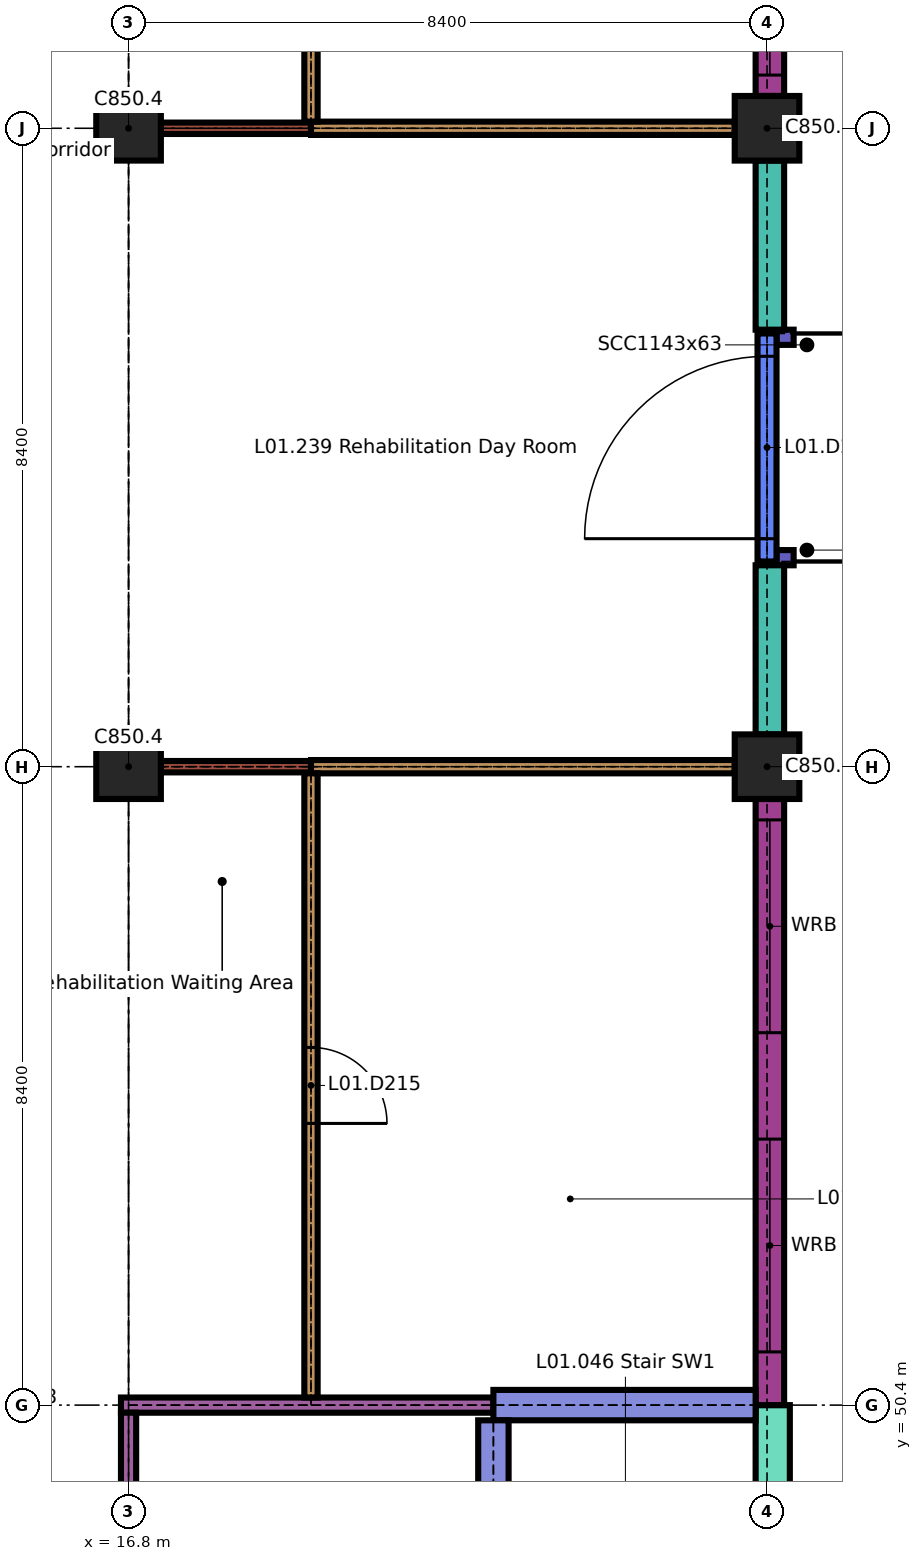
"""IFC4 building model, lengths in metres.
Left out: names, types, materials, properties, quantities, classifications, styles, units other than length and angle.
Written with IfcOpenShell. Run it as: python <this file> out.ifc"""

import sys

from ifc_helpers import new_model, si_unit, direction, frame, frame_2d, origin, origin_2d, place, context, subcontext, project, spatial, rectangle, hollow_circle, extrude, element, fill, save


model = new_model("IFC4")
c1 = context("Model", 3, precision=1e-05, world=origin(), true_north=direction((0.0, 1.0)))
c2 = subcontext(c1, "Body", "Model", "MODEL_VIEW")
j1 = project(units=[si_unit("LENGTHUNIT", "METRE"), si_unit("PLANEANGLEUNIT", "RADIAN")], contexts=[c1])
p1 = place(None, origin())
s1 = spatial("IfcSite", under=j1, at=p1, CompositionType="ELEMENT")
p2 = place(p1, origin())
s2 = spatial("IfcBuilding", under=s1, at=p2, CompositionType="ELEMENT")
p3 = place(p2, frame((0.0, 0.0, 4.5)))
s3 = spatial("IfcBuildingStorey", under=s2, at=p3, CompositionType="ELEMENT", Elevation=4.5)
for number, where, z_axis, x_axis in (
    (1, (16.8, 58.8, 0.0), (0.0, 0.0, 1.0), (1.0, 0.0, 0.0)),
    (2, (25.2, 58.8, 0.0), (0.0, 0.0, 1.0), (1.0, 0.0, 0.0)),
    (3, (16.8, 67.2, 0.0), (0.0, 0.0, 1.0), (1.0, 0.0, 0.0)),
    (4, (25.2, 67.2, 0.0), (0.0, 0.0, 1.0), (1.0, 0.0, 0.0)),
):
    element("IfcColumn", number, at=place(p3, frame(where, z_axis=z_axis, x_axis=x_axis)), inside=s3, PredefinedType="COLUMN", context=c2, shape_type="SweptSolid", body=[
        extrude(rectangle(XDim=0.85, YDim=0.85, at=origin_2d()), origin(), (0.0, 0.0, 1.0), 3.45),
    ])
for number, where, z_axis, x_axis in (
    (5, (25.725, 61.65, 0.0), (0.0, 0.0, 1.0), (1.0, 0.0, 0.0)),
    (6, (25.725, 64.35, 0.0), (0.0, 0.0, 1.0), (1.0, 0.0, 0.0)),
):
    element("IfcColumn", number, at=place(p3, frame(where, z_axis=z_axis, x_axis=x_axis)), inside=s3, PredefinedType="COLUMN", context=c2, shape_type="SweptSolid", body=[
        extrude(hollow_circle(Radius=0.057, WallThickness=0.006, at=origin_2d()), origin(), (0.0, 0.0, 1.0), 3.117),
    ])
for number, where, z_axis, x_axis in (
    (7, (25.325, 61.55, 0.0), (0.0, 0.0, 1.0), (1.0, 0.0, 0.0)),
    (8, (25.325, 64.45, 0.0), (0.0, 0.0, 1.0), (1.0, 0.0, 0.0)),
):
    element("IfcWall", number, at=place(p3, frame(where, z_axis=z_axis, x_axis=x_axis)), inside=s3, PredefinedType="SOLIDWALL", context=c2, shape_type="SweptSolid", body=[
        extrude(rectangle(XDim=0.225, YDim=0.2, at=frame_2d((0.113, 0.0))), origin(), (0.0, 0.0, 1.0), 3.25),
    ])
p4 = place(p3, frame((25.275, 46.55, 0.0), z_axis=(0.0, 0.0, 1.0), x_axis=(0.0, 1.0, 0.0)))
e9 = element("IfcWall", 9, at=p4, inside=s3, PredefinedType="SOLIDWALL", context=c2, shape_type="SweptSolid", body=[
    extrude(rectangle(XDim=3.85, YDim=0.45, at=frame_2d((1.925, 0.0))), origin(), (0.0, 0.0, 1.0), 3.45),
])
p5 = place(p3, frame((25.238, 50.4, 0.0), z_axis=(0.0, 0.0, 1.0), x_axis=(0.0, 1.0, 0.0)))
e10 = element("IfcWall", 10, at=p5, inside=s3, PredefinedType="SOLIDWALL", context=c2, shape_type="SweptSolid", body=[
    extrude(rectangle(XDim=7.975, YDim=0.375, at=frame_2d((3.988, 0.0))), origin(), (0.0, 0.0, 1.0), 3.15),
])
p6 = place(p5, frame((0.7, 0.0, 1.0)))
e11 = element("IfcOpeningElement", 11, at=p6, cuts=e10, PredefinedType="OPENING", context=c2, shape_type="SweptSolid", body=[
    extrude(rectangle(XDim=2.8, YDim=1.2, at=frame_2d((1.4, 0.6))), frame((0.0, 0.198, 0.0), z_axis=(0.0, -1.0, 0.0), x_axis=(1.0, 0.0, 0.0)), (0.0, 0.0, 1.0), 0.395),
])
p7 = place(p5, frame((4.9, 0.0, 1.0)))
e12 = element("IfcOpeningElement", 12, at=p7, cuts=e10, PredefinedType="OPENING", context=c2, shape_type="SweptSolid", body=[
    extrude(rectangle(XDim=2.8, YDim=1.2, at=frame_2d((1.4, 0.6))), frame((0.0, 0.198, 0.0), z_axis=(0.0, -1.0, 0.0), x_axis=(1.0, 0.0, 0.0)), (0.0, 0.0, 1.0), 0.395),
])
for number, where, z_axis, x_axis in (
    (13, (25.238, 59.225, 0.0), (0.0, 0.0, 1.0), (0.0, 1.0, 0.0)),
    (14, (25.238, 64.55, 0.0), (0.0, 0.0, 1.0), (0.0, 1.0, 0.0)),
):
    element("IfcWall", number, at=place(p3, frame(where, z_axis=z_axis, x_axis=x_axis)), inside=s3, PredefinedType="SOLIDWALL", context=c2, shape_type="SweptSolid", body=[
        extrude(rectangle(XDim=2.225, YDim=0.375, at=frame_2d((1.112, 0.0))), origin(), (0.0, 0.0, 1.0), 3.45),
    ])
p8 = place(p3, frame((25.238, 67.625, 0.0), z_axis=(0.0, 0.0, 1.0), x_axis=(0.0, 1.0, 0.0)))
e15 = element("IfcWall", 15, at=p8, inside=s3, PredefinedType="SOLIDWALL", context=c2, shape_type="SweptSolid", body=[
    extrude(rectangle(XDim=7.975, YDim=0.375, at=frame_2d((3.988, 0.0))), origin(), (0.0, 0.0, 1.0), 3.15),
])
p9 = place(p8, frame((0.275, 0.0, 1.0)))
e16 = element("IfcOpeningElement", 16, at=p9, cuts=e15, PredefinedType="OPENING", context=c2, shape_type="SweptSolid", body=[
    extrude(rectangle(XDim=2.8, YDim=1.2, at=frame_2d((1.4, 0.6))), frame((0.0, 0.198, 0.0), z_axis=(0.0, -1.0, 0.0), x_axis=(1.0, 0.0, 0.0)), (0.0, 0.0, 1.0), 0.395),
])
p10 = place(p8, frame((4.475, 0.0, 1.0)))
e17 = element("IfcOpeningElement", 17, at=p10, cuts=e15, PredefinedType="OPENING", context=c2, shape_type="SweptSolid", body=[
    extrude(rectangle(XDim=2.8, YDim=1.2, at=frame_2d((1.4, 0.6))), frame((0.0, 0.198, 0.0), z_axis=(0.0, -1.0, 0.0), x_axis=(1.0, 0.0, 0.0)), (0.0, 0.0, 1.0), 0.395),
])
p11 = place(p3, frame((16.7, 50.4, 0.0), z_axis=(0.0, 0.0, 1.0), x_axis=(1.0, 0.0, 0.0)))
e18 = element("IfcWall", 18, at=p11, inside=s3, PredefinedType="PARTITIONING", context=c2, shape_type="SweptSolid", body=[
    extrude(rectangle(XDim=4.9, YDim=0.2, at=frame_2d((2.45, 0.0))), origin(), (0.0, 0.0, 1.0), 3.45),
])
p12 = place(p3, frame((21.6, 50.4, 0.0), z_axis=(0.0, 0.0, 1.0), x_axis=(1.0, 0.0, 0.0)))
e19 = element("IfcWall", 19, at=p12, inside=s3, PredefinedType="SHEAR", context=c2, shape_type="SweptSolid", body=[
    extrude(rectangle(XDim=3.45, YDim=0.4, at=frame_2d((1.725, 0.0))), origin(), (0.0, 0.0, 1.0), 3.45),
])
p13 = place(p3, frame((17.225, 58.8, 0.0), z_axis=(0.0, 0.0, 1.0), x_axis=(1.0, 0.0, 0.0)))
e20 = element("IfcWall", 20, at=p13, inside=s3, PredefinedType="PARTITIONING", context=c2, shape_type="SweptSolid", body=[
    extrude(rectangle(XDim=1.975, YDim=0.15, at=frame_2d((0.987, 0.0))), origin(), (0.0, 0.0, 1.0), 3.45),
])
p14 = place(p3, frame((19.2, 58.8, 0.0), z_axis=(0.0, 0.0, 1.0), x_axis=(1.0, 0.0, 0.0)))
e21 = element("IfcWall", 21, at=p14, inside=s3, PredefinedType="PARTITIONING", context=c2, shape_type="SweptSolid", body=[
    extrude(rectangle(XDim=5.575, YDim=0.175, at=frame_2d((2.788, 0.0))), origin(), (0.0, 0.0, 1.0), 3.45),
])
p15 = place(p3, frame((17.225, 67.2, 0.0), z_axis=(0.0, 0.0, 1.0), x_axis=(1.0, 0.0, 0.0)))
e22 = element("IfcWall", 22, at=p15, inside=s3, PredefinedType="PARTITIONING", context=c2, shape_type="SweptSolid", body=[
    extrude(rectangle(XDim=1.975, YDim=0.15, at=frame_2d((0.987, 0.0))), origin(), (0.0, 0.0, 1.0), 3.45),
])
p16 = place(p3, frame((19.2, 67.2, 0.0), z_axis=(0.0, 0.0, 1.0), x_axis=(1.0, 0.0, 0.0)))
e23 = element("IfcWall", 23, at=p16, inside=s3, PredefinedType="PARTITIONING", context=c2, shape_type="SweptSolid", body=[
    extrude(rectangle(XDim=5.575, YDim=0.175, at=frame_2d((2.788, 0.0))), origin(), (0.0, 0.0, 1.0), 3.45),
])
p17 = place(p3, frame((16.8, 42.1, 0.0), z_axis=(0.0, 0.0, 1.0), x_axis=(0.0, 1.0, 0.0)))
e24 = element("IfcWall", 24, at=p17, inside=s3, PredefinedType="PARTITIONING", context=c2, shape_type="SweptSolid", body=[
    extrude(rectangle(XDim=8.2, YDim=0.2, at=frame_2d((4.1, 0.0))), origin(), (0.0, 0.0, 1.0), 3.45),
])
p18 = place(p17, frame((3.4, 0.0, 0.0)))
e25 = element("IfcOpeningElement", 25, at=p18, cuts=e24, PredefinedType="OPENING", context=c2, shape_type="SweptSolid", body=[
    extrude(rectangle(XDim=1.4, YDim=2.1, at=frame_2d((0.7, 1.05))), frame((0.0, 0.11, 0.0), z_axis=(0.0, -1.0, 0.0), x_axis=(1.0, 0.0, 0.0)), (0.0, 0.0, 1.0), 0.22),
])
p19 = place(p3, frame((19.2, 50.5, 0.0), z_axis=(0.0, 0.0, 1.0), x_axis=(0.0, 1.0, 0.0)))
e26 = element("IfcWall", 26, at=p19, inside=s3, PredefinedType="PARTITIONING", context=c2, shape_type="SweptSolid", body=[
    extrude(rectangle(XDim=8.212, YDim=0.175, at=frame_2d((4.106, 0.0))), origin(), (0.0, 0.0, 1.0), 3.45),
])
p20 = place(p19, frame((3.606, 0.0, 0.0)))
e27 = element("IfcOpeningElement", 27, at=p20, cuts=e26, PredefinedType="OPENING", context=c2, shape_type="SweptSolid", body=[
    extrude(rectangle(XDim=1.0, YDim=2.1, at=frame_2d((0.5, 1.05))), frame((0.0, 0.097, 0.0), z_axis=(0.0, -1.0, 0.0), x_axis=(1.0, 0.0, 0.0)), (0.0, 0.0, 1.0), 0.195),
])
p21 = place(p3, frame((19.2, 67.288, 0.0), z_axis=(0.0, 0.0, 1.0), x_axis=(0.0, 1.0, 0.0)))
e28 = element("IfcWall", 28, at=p21, inside=s3, PredefinedType="PARTITIONING", context=c2, shape_type="SweptSolid", body=[
    extrude(rectangle(XDim=8.212, YDim=0.175, at=frame_2d((4.106, 0.0))), origin(), (0.0, 0.0, 1.0), 3.45),
])
p22 = place(p21, frame((3.606, 0.0, 0.0)))
e29 = element("IfcOpeningElement", 29, at=p22, cuts=e28, PredefinedType="OPENING", context=c2, shape_type="SweptSolid", body=[
    extrude(rectangle(XDim=1.0, YDim=2.1, at=frame_2d((0.5, 1.05))), frame((0.0, 0.097, 0.0), z_axis=(0.0, -1.0, 0.0), x_axis=(1.0, 0.0, 0.0)), (0.0, 0.0, 1.0), 0.195),
])
p23 = place(p3, frame((21.6, 42.2, 0.0), z_axis=(0.0, 0.0, 1.0), x_axis=(0.0, 1.0, 0.0)))
e30 = element("IfcWall", 30, at=p23, inside=s3, PredefinedType="SHEAR", context=c2, shape_type="SweptSolid", body=[
    extrude(rectangle(XDim=8.0, YDim=0.4, at=frame_2d((4.0, 0.0))), origin(), (0.0, 0.0, 1.0), 3.45),
])
p24 = place(p23, frame((0.4, 0.0, 0.0)))
e31 = element("IfcOpeningElement", 31, at=p24, cuts=e30, PredefinedType="OPENING", context=c2, shape_type="SweptSolid", body=[
    extrude(rectangle(XDim=1.2, YDim=2.1, at=frame_2d((0.6, 1.05))), frame((0.0, 0.21, 0.0), z_axis=(0.0, -1.0, 0.0), x_axis=(1.0, 0.0, 0.0)), (0.0, 0.0, 1.0), 0.42),
])
p25 = place(p3, frame((25.2, 61.5, 0.0), z_axis=(0.0, 0.0, 1.0), x_axis=(0.0, 1.0, 0.0)))
e32 = element("IfcWall", 32, at=p25, inside=s3, PredefinedType="SOLIDWALL", context=c2, shape_type="SweptSolid", body=[
    extrude(rectangle(XDim=3.0, YDim=0.25, at=frame_2d((1.5, 0.0))), origin(), (0.0, 0.0, 1.0), 3.45),
])
p26 = place(p25, frame((0.3, 0.0, 0.0)))
e33 = element("IfcOpeningElement", 33, at=p26, cuts=e32, PredefinedType="OPENING", context=c2, shape_type="SweptSolid", body=[
    extrude(rectangle(XDim=2.4, YDim=2.4, at=frame_2d((1.2, 1.2))), frame((0.0, 0.135, 0.0), z_axis=(0.0, -1.0, 0.0), x_axis=(1.0, 0.0, 0.0)), (0.0, 0.0, 1.0), 0.27),
])
p27 = place(p6, origin())
e34 = element("IfcWindow", 34, at=p27, inside=s3, PartitioningType="DOUBLE_PANEL_VERTICAL", PredefinedType="WINDOW", context=c2, shape_type="SweptSolid", body=[
    extrude(rectangle(XDim=2.8, YDim=1.2, at=frame_2d((1.4, 0.6))), frame((0.0, 0.03, 0.0), z_axis=(0.0, -1.0, 0.0), x_axis=(1.0, 0.0, 0.0)), (0.0, 0.0, 1.0), 0.06),
])
fill(e11, e34)
p28 = place(p7, origin())
e35 = element("IfcWindow", 35, at=p28, inside=s3, PartitioningType="DOUBLE_PANEL_VERTICAL", PredefinedType="WINDOW", context=c2, shape_type="SweptSolid", body=[
    extrude(rectangle(XDim=2.8, YDim=1.2, at=frame_2d((1.4, 0.6))), frame((0.0, 0.03, 0.0), z_axis=(0.0, -1.0, 0.0), x_axis=(1.0, 0.0, 0.0)), (0.0, 0.0, 1.0), 0.06),
])
fill(e12, e35)
p29 = place(p9, origin())
e36 = element("IfcWindow", 36, at=p29, inside=s3, PartitioningType="DOUBLE_PANEL_VERTICAL", PredefinedType="WINDOW", context=c2, shape_type="SweptSolid", body=[
    extrude(rectangle(XDim=2.8, YDim=1.2, at=frame_2d((1.4, 0.6))), frame((0.0, 0.03, 0.0), z_axis=(0.0, -1.0, 0.0), x_axis=(1.0, 0.0, 0.0)), (0.0, 0.0, 1.0), 0.06),
])
fill(e16, e36)
p30 = place(p20, origin())
e37 = element("IfcDoor", 37, at=p30, inside=s3, OperationType="SINGLE_SWING_LEFT", PredefinedType="DOOR", context=c2, shape_type="SweptSolid", body=[
    extrude(rectangle(XDim=1.0, YDim=2.1, at=frame_2d((0.5, 1.05))), frame((0.0, 0.035, 0.0), z_axis=(0.0, -1.0, 0.0), x_axis=(1.0, 0.0, 0.0)), (0.0, 0.0, 1.0), 0.07),
])
fill(e27, e37)
p31 = place(p26, origin())
e38 = element("IfcDoor", 38, at=p31, inside=s3, OperationType="SINGLE_SWING_RIGHT", PredefinedType="DOOR", context=c2, shape_type="SweptSolid", body=[
    extrude(rectangle(XDim=2.4, YDim=2.4, at=frame_2d((1.2, 1.2))), frame((0.0, 0.025, 0.0), z_axis=(0.0, -1.0, 0.0), x_axis=(1.0, 0.0, 0.0)), (0.0, 0.0, 1.0), 0.05),
])
fill(e33, e38)
save(model, sys.argv[1])
